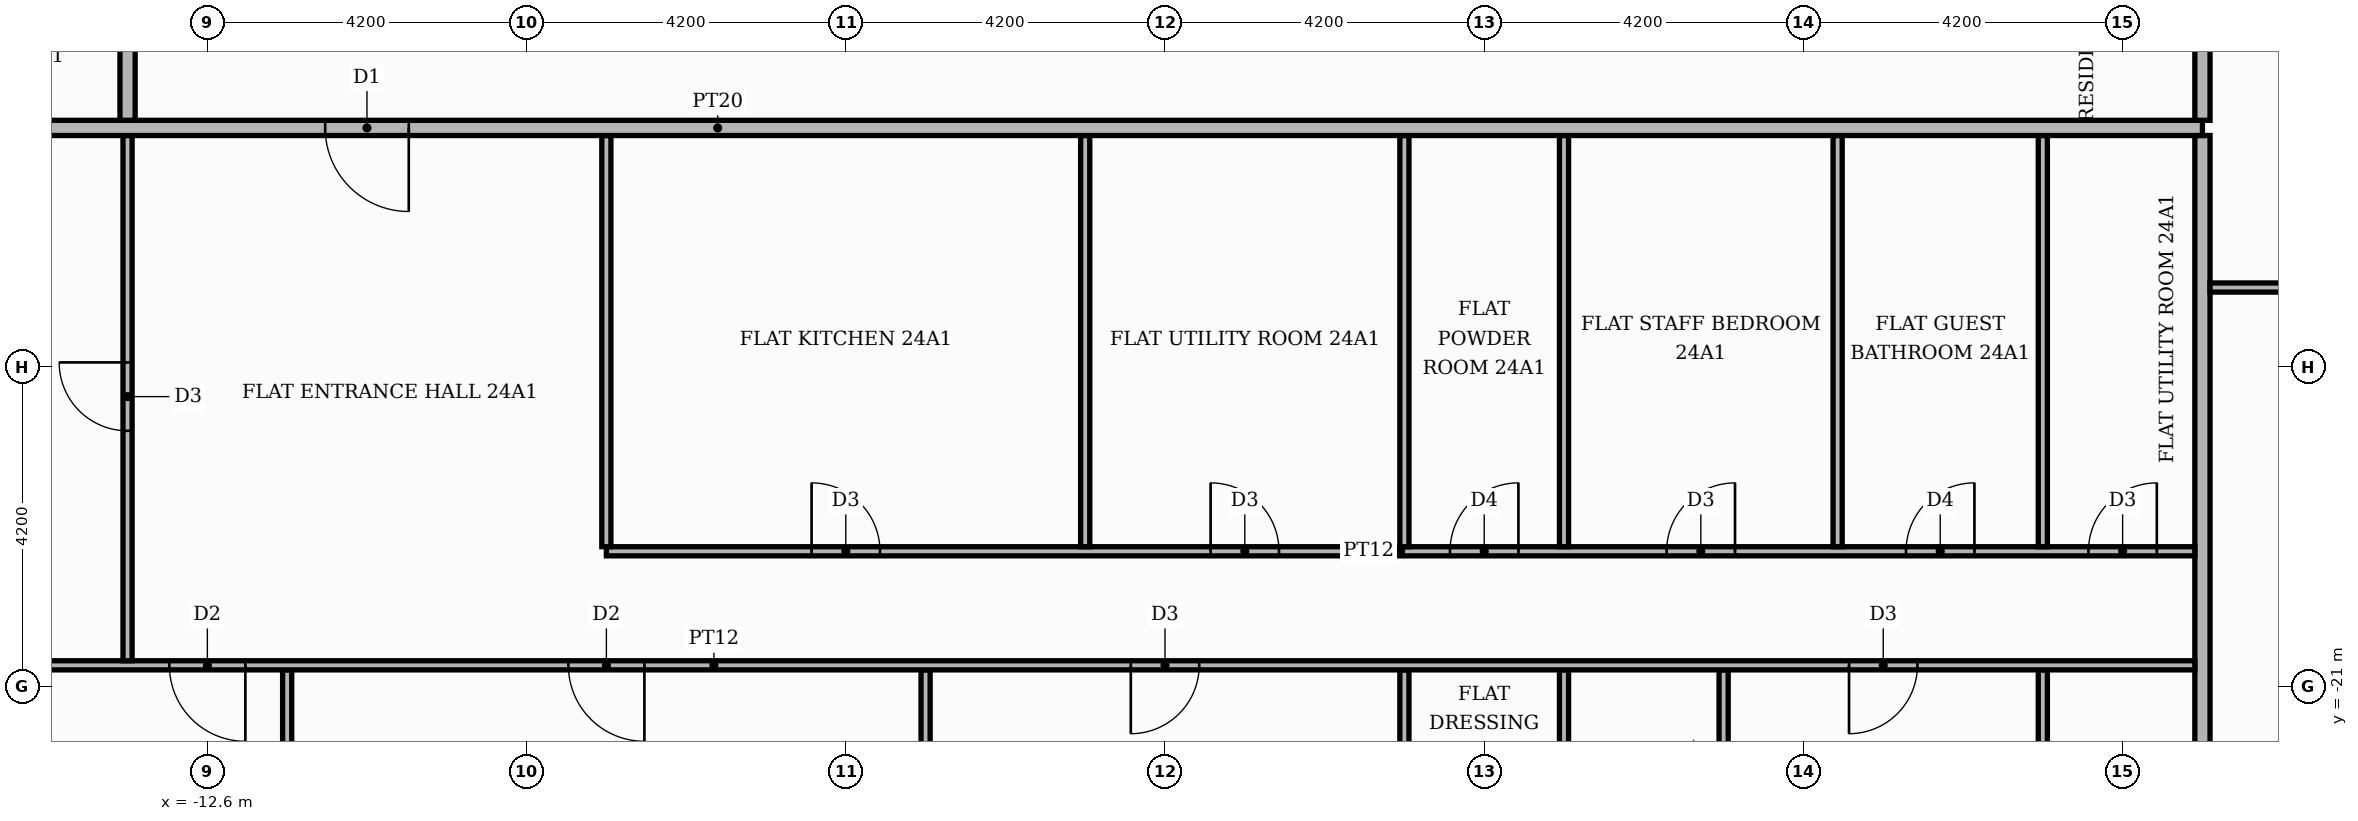
"""IFC4 building model, lengths in metres.
Left out: names, types, materials, properties, quantities, classifications, styles, units other than length and angle.
Written with IfcOpenShell. Run it as: python <this file> out.ifc"""

import sys

from ifc_helpers import new_model, si_unit, direction, frame, frame_2d, origin, place, context, subcontext, project, spatial, rectangle, extrude, element, fill, save


model = new_model("IFC4")
c1 = context("Model", 3, precision=1e-05, world=origin(), true_north=direction((0.0, 1.0)))
c2 = subcontext(c1, "Body", "Model", "MODEL_VIEW")
j1 = project(units=[si_unit("LENGTHUNIT", "METRE"), si_unit("PLANEANGLEUNIT", "RADIAN")], contexts=[c1])
p1 = place(None, origin())
s1 = spatial("IfcSite", under=j1, at=p1, CompositionType="ELEMENT")
p2 = place(p1, origin())
s2 = spatial("IfcBuilding", under=s1, at=p2, CompositionType="ELEMENT")
p3 = place(p2, frame((0.0, 0.0, 102.6)))
s3 = spatial("IfcBuildingStorey", under=s2, at=p3, CompositionType="ELEMENT", Elevation=102.6)
for number, where, z_axis, x_axis in (
    (1, (-11.55, -25.42, 0.0), (0.0, 0.0, 1.0), (0.0, 1.0, 0.0)),
    (2, (-3.15, -25.42, 0.0), (0.0, 0.0, 1.0), (0.0, 1.0, 0.0)),
):
    element("IfcWall", number, at=place(p3, frame(where, z_axis=z_axis, x_axis=x_axis)), inside=s3, PredefinedType="PARTITIONING", context=c2, shape_type="SweptSolid", body=[
        extrude(rectangle(XDim=4.64, YDim=0.12, at=frame_2d((2.32, 0.0))), origin(), (0.0, 0.0, 1.0), 3.48),
    ])
p4 = place(p3, frame((3.15, -25.42, 0.0), z_axis=(0.0, 0.0, 1.0), x_axis=(0.0, 1.0, 0.0)))
e3 = element("IfcWall", 3, at=p4, inside=s3, PredefinedType="PARTITIONING", context=c2, shape_type="SweptSolid", body=[
    extrude(rectangle(XDim=4.64, YDim=0.12, at=frame_2d((2.32, 0.0))), origin(), (0.0, 0.0, 1.0), 3.48),
])
p5 = place(p4, frame((1.75, 0.0, 0.0)))
e4 = element("IfcOpeningElement", 4, at=p5, cuts=e3, PredefinedType="OPENING", context=c2, shape_type="SweptSolid", body=[
    extrude(rectangle(XDim=0.9, YDim=2.1, at=frame_2d((0.45, 1.05))), frame((0.0, 0.07, 0.0), z_axis=(0.0, -1.0, 0.0), x_axis=(1.0, 0.0, 0.0)), (0.0, 0.0, 1.0), 0.14),
])
p6 = place(p3, frame((5.25, -25.42, 0.0), z_axis=(0.0, 0.0, 1.0), x_axis=(0.0, 1.0, 0.0)))
e5 = element("IfcWall", 5, at=p6, inside=s3, PredefinedType="PARTITIONING", context=c2, shape_type="SweptSolid", body=[
    extrude(rectangle(XDim=4.64, YDim=0.12, at=frame_2d((2.32, 0.0))), origin(), (0.0, 0.0, 1.0), 3.48),
])
p7 = place(p6, frame((1.75, 0.0, 0.0)))
e6 = element("IfcOpeningElement", 6, at=p7, cuts=e5, PredefinedType="OPENING", context=c2, shape_type="SweptSolid", body=[
    extrude(rectangle(XDim=0.9, YDim=2.1, at=frame_2d((0.45, 1.05))), frame((0.0, 0.07, 0.0), z_axis=(0.0, -1.0, 0.0), x_axis=(1.0, 0.0, 0.0)), (0.0, 0.0, 1.0), 0.14),
])
p8 = place(p3, frame((7.35, -25.42, 0.0), z_axis=(0.0, 0.0, 1.0), x_axis=(0.0, 1.0, 0.0)))
e7 = element("IfcWall", 7, at=p8, inside=s3, PredefinedType="PARTITIONING", context=c2, shape_type="SweptSolid", body=[
    extrude(rectangle(XDim=4.64, YDim=0.12, at=frame_2d((2.32, 0.0))), origin(), (0.0, 0.0, 1.0), 3.48),
])
p9 = place(p3, frame((11.55, -25.42, 0.0), z_axis=(0.0, 0.0, 1.0), x_axis=(0.0, 1.0, 0.0)))
e8 = element("IfcWall", 8, at=p9, inside=s3, PredefinedType="PARTITIONING", context=c2, shape_type="SweptSolid", body=[
    extrude(rectangle(XDim=4.64, YDim=0.12, at=frame_2d((2.32, 0.0))), origin(), (0.0, 0.0, 1.0), 3.48),
])
p10 = place(p9, frame((1.75, 0.0, 0.0)))
e9 = element("IfcOpeningElement", 9, at=p10, cuts=e8, PredefinedType="OPENING", context=c2, shape_type="SweptSolid", body=[
    extrude(rectangle(XDim=0.9, YDim=2.1, at=frame_2d((0.45, 1.05))), frame((0.0, 0.07, 0.0), z_axis=(0.0, -1.0, 0.0), x_axis=(1.0, 0.0, 0.0)), (0.0, 0.0, 1.0), 0.14),
])
p11 = place(p3, frame((13.65, -25.42, 0.0), z_axis=(0.0, 0.0, 1.0), x_axis=(0.0, 1.0, 0.0)))
e10 = element("IfcWall", 10, at=p11, inside=s3, PredefinedType="PARTITIONING", context=c2, shape_type="SweptSolid", body=[
    extrude(rectangle(XDim=11.67, YDim=0.2, at=frame_2d((5.835, 0.0))), origin(), (0.0, 0.0, 1.0), 3.48),
])
p12 = place(p3, frame((-25.42, -20.72, 0.0), z_axis=(0.0, 0.0, 1.0), x_axis=(1.0, 0.0, 0.0)))
e11 = element("IfcWall", 11, at=p12, inside=s3, PredefinedType="PARTITIONING", context=c2, shape_type="SweptSolid", body=[
    extrude(rectangle(XDim=38.97, YDim=0.12, at=frame_2d((19.485, 0.0))), origin(), (0.0, 0.0, 1.0), 3.48),
])
p13 = place(p12, frame((12.32, 0.0, 0.0)))
e12 = element("IfcOpeningElement", 12, at=p13, cuts=e11, PredefinedType="OPENING", context=c2, shape_type="SweptSolid", body=[
    extrude(rectangle(XDim=1.0, YDim=2.1, at=frame_2d((0.5, 1.05))), frame((0.0, 0.07, 0.0), z_axis=(0.0, -1.0, 0.0), x_axis=(1.0, 0.0, 0.0)), (0.0, 0.0, 1.0), 0.14),
])
p14 = place(p12, frame((17.57, 0.0, 0.0)))
e13 = element("IfcOpeningElement", 13, at=p14, cuts=e11, PredefinedType="OPENING", context=c2, shape_type="SweptSolid", body=[
    extrude(rectangle(XDim=1.0, YDim=2.1, at=frame_2d((0.5, 1.05))), frame((0.0, 0.07, 0.0), z_axis=(0.0, -1.0, 0.0), x_axis=(1.0, 0.0, 0.0)), (0.0, 0.0, 1.0), 0.14),
])
p15 = place(p12, frame((24.97, 0.0, 0.0)))
e14 = element("IfcOpeningElement", 14, at=p15, cuts=e11, PredefinedType="OPENING", context=c2, shape_type="SweptSolid", body=[
    extrude(rectangle(XDim=0.9, YDim=2.1, at=frame_2d((0.45, 1.05))), frame((0.0, 0.07, 0.0), z_axis=(0.0, -1.0, 0.0), x_axis=(1.0, 0.0, 0.0)), (0.0, 0.0, 1.0), 0.14),
])
p16 = place(p12, frame((34.42, 0.0, 0.0)))
e15 = element("IfcOpeningElement", 15, at=p16, cuts=e11, PredefinedType="OPENING", context=c2, shape_type="SweptSolid", body=[
    extrude(rectangle(XDim=0.9, YDim=2.1, at=frame_2d((0.45, 1.05))), frame((0.0, 0.07, 0.0), z_axis=(0.0, -1.0, 0.0), x_axis=(1.0, 0.0, 0.0)), (0.0, 0.0, 1.0), 0.14),
])
p17 = place(p3, frame((-13.65, -20.66, 0.0), z_axis=(0.0, 0.0, 1.0), x_axis=(0.0, 1.0, 0.0)))
e16 = element("IfcWall", 16, at=p17, inside=s3, PredefinedType="PARTITIONING", context=c2, shape_type="SweptSolid", body=[
    extrude(rectangle(XDim=6.91, YDim=0.12, at=frame_2d((3.455, 0.0))), origin(), (0.0, 0.0, 1.0), 3.48),
])
p18 = place(p17, frame((3.025, 0.0, 0.0)))
e17 = element("IfcOpeningElement", 17, at=p18, cuts=e16, PredefinedType="OPENING", context=c2, shape_type="SweptSolid", body=[
    extrude(rectangle(XDim=0.9, YDim=2.1, at=frame_2d((0.45, 1.05))), frame((0.0, 0.07, 0.0), z_axis=(0.0, -1.0, 0.0), x_axis=(1.0, 0.0, 0.0)), (0.0, 0.0, 1.0), 0.14),
])
p19 = place(p3, frame((-7.35, -19.22, 0.0), z_axis=(0.0, 0.0, 1.0), x_axis=(1.0, 0.0, 0.0)))
e18 = element("IfcWall", 18, at=p19, inside=s3, PredefinedType="PARTITIONING", context=c2, shape_type="SweptSolid", body=[
    extrude(rectangle(XDim=20.9, YDim=0.12, at=frame_2d((10.45, 0.0))), origin(), (0.0, 0.0, 1.0), 3.48),
])
p20 = place(p19, frame((2.7, 0.0, 0.0)))
e19 = element("IfcOpeningElement", 19, at=p20, cuts=e18, PredefinedType="OPENING", context=c2, shape_type="SweptSolid", body=[
    extrude(rectangle(XDim=0.9, YDim=2.1, at=frame_2d((0.45, 1.05))), frame((0.0, 0.07, 0.0), z_axis=(0.0, -1.0, 0.0), x_axis=(1.0, 0.0, 0.0)), (0.0, 0.0, 1.0), 0.14),
])
p21 = place(p19, frame((7.95, 0.0, 0.0)))
e20 = element("IfcOpeningElement", 20, at=p21, cuts=e18, PredefinedType="OPENING", context=c2, shape_type="SweptSolid", body=[
    extrude(rectangle(XDim=0.9, YDim=2.1, at=frame_2d((0.45, 1.05))), frame((0.0, 0.07, 0.0), z_axis=(0.0, -1.0, 0.0), x_axis=(1.0, 0.0, 0.0)), (0.0, 0.0, 1.0), 0.14),
])
p22 = place(p19, frame((11.1, 0.0, 0.0)))
e21 = element("IfcOpeningElement", 21, at=p22, cuts=e18, PredefinedType="OPENING", context=c2, shape_type="SweptSolid", body=[
    extrude(rectangle(XDim=0.9, YDim=2.1, at=frame_2d((0.45, 1.05))), frame((0.0, 0.07, 0.0), z_axis=(0.0, -1.0, 0.0), x_axis=(1.0, 0.0, 0.0)), (0.0, 0.0, 1.0), 0.14),
])
p23 = place(p19, frame((13.95, 0.0, 0.0)))
e22 = element("IfcOpeningElement", 22, at=p23, cuts=e18, PredefinedType="OPENING", context=c2, shape_type="SweptSolid", body=[
    extrude(rectangle(XDim=0.9, YDim=2.1, at=frame_2d((0.45, 1.05))), frame((0.0, 0.07, 0.0), z_axis=(0.0, -1.0, 0.0), x_axis=(1.0, 0.0, 0.0)), (0.0, 0.0, 1.0), 0.14),
])
p24 = place(p19, frame((17.1, 0.0, 0.0)))
e23 = element("IfcOpeningElement", 23, at=p24, cuts=e18, PredefinedType="OPENING", context=c2, shape_type="SweptSolid", body=[
    extrude(rectangle(XDim=0.9, YDim=2.1, at=frame_2d((0.45, 1.05))), frame((0.0, 0.07, 0.0), z_axis=(0.0, -1.0, 0.0), x_axis=(1.0, 0.0, 0.0)), (0.0, 0.0, 1.0), 0.14),
])
p25 = place(p19, frame((19.5, 0.0, 0.0)))
e24 = element("IfcOpeningElement", 24, at=p25, cuts=e18, PredefinedType="OPENING", context=c2, shape_type="SweptSolid", body=[
    extrude(rectangle(XDim=0.9, YDim=2.1, at=frame_2d((0.45, 1.05))), frame((0.0, 0.07, 0.0), z_axis=(0.0, -1.0, 0.0), x_axis=(1.0, 0.0, 0.0)), (0.0, 0.0, 1.0), 0.14),
])
for number, where, z_axis, x_axis in (
    (25, (-7.35, -19.16, 0.0), (0.0, 0.0, 1.0), (0.0, 1.0, 0.0)),
    (26, (-1.05, -19.16, 0.0), (0.0, 0.0, 1.0), (0.0, 1.0, 0.0)),
    (27, (3.15, -19.16, 0.0), (0.0, 0.0, 1.0), (0.0, 1.0, 0.0)),
    (28, (5.25, -19.16, 0.0), (0.0, 0.0, 1.0), (0.0, 1.0, 0.0)),
    (29, (8.85, -19.16, 0.0), (0.0, 0.0, 1.0), (0.0, 1.0, 0.0)),
    (30, (11.55, -19.16, 0.0), (0.0, 0.0, 1.0), (0.0, 1.0, 0.0)),
):
    element("IfcWall", number, at=place(p3, frame(where, z_axis=z_axis, x_axis=x_axis)), inside=s3, PredefinedType="PARTITIONING", context=c2, shape_type="SweptSolid", body=[
        extrude(rectangle(XDim=5.41, YDim=0.12, at=frame_2d((2.705, 0.0))), origin(), (0.0, 0.0, 1.0), 3.48),
    ])
p26 = place(p3, frame((13.75, -15.75, 0.0), z_axis=(0.0, 0.0, 1.0), x_axis=(1.0, 0.0, 0.0)))
e31 = element("IfcWall", 31, at=p26, inside=s3, PredefinedType="PARTITIONING", context=c2, shape_type="SweptSolid", body=[
    extrude(rectangle(XDim=6.07, YDim=0.12, at=frame_2d((3.035, 0.0))), origin(), (0.0, 0.0, 1.0), 3.48),
])
p27 = place(p26, frame((2.485, 0.0, 0.0)))
e32 = element("IfcOpeningElement", 32, at=p27, cuts=e31, PredefinedType="OPENING", context=c2, shape_type="SweptSolid", body=[
    extrude(rectangle(XDim=1.0, YDim=2.1, at=frame_2d((0.5, 1.05))), frame((0.0, 0.07, 0.0), z_axis=(0.0, -1.0, 0.0), x_axis=(1.0, 0.0, 0.0)), (0.0, 0.0, 1.0), 0.14),
])
p28 = place(p3, frame((-25.42, -13.65, 0.0), z_axis=(0.0, 0.0, 1.0), x_axis=(1.0, 0.0, 0.0)))
e33 = element("IfcWall", 33, at=p28, inside=s3, PredefinedType="PARTITIONING", context=c2, shape_type="SweptSolid", body=[
    extrude(rectangle(XDim=39.07, YDim=0.2, at=frame_2d((19.535, 0.0))), origin(), (0.0, 0.0, 1.0), 3.48),
])
p29 = place(p28, frame((14.37, 0.0, 0.0)))
e34 = element("IfcOpeningElement", 34, at=p29, cuts=e33, PredefinedType="OPENING", context=c2, shape_type="SweptSolid", body=[
    extrude(rectangle(XDim=1.1, YDim=2.4, at=frame_2d((0.55, 1.2))), frame((0.0, 0.11, 0.0), z_axis=(0.0, -1.0, 0.0), x_axis=(1.0, 0.0, 0.0)), (0.0, 0.0, 1.0), 0.22),
])
p30 = place(p3, frame((-13.65, -13.55, 0.0), z_axis=(0.0, 0.0, 1.0), x_axis=(0.0, 1.0, 0.0)))
e35 = element("IfcWall", 35, at=p30, inside=s3, PredefinedType="PARTITIONING", context=c2, shape_type="SweptSolid", body=[
    extrude(rectangle(XDim=27.1, YDim=0.2, at=frame_2d((13.55, 0.0))), origin(), (0.0, 0.0, 1.0), 3.48),
])
p31 = place(p30, frame((23.5, 0.0, 0.0)))
e36 = element("IfcOpeningElement", 36, at=p31, cuts=e35, PredefinedType="OPENING", context=c2, shape_type="SweptSolid", body=[
    extrude(rectangle(XDim=1.1, YDim=2.4, at=frame_2d((0.55, 1.2))), frame((0.0, 0.11, 0.0), z_axis=(0.0, -1.0, 0.0), x_axis=(1.0, 0.0, 0.0)), (0.0, 0.0, 1.0), 0.22),
])
p32 = place(p3, frame((13.65, -13.55, 0.0), z_axis=(0.0, 0.0, 1.0), x_axis=(0.0, 1.0, 0.0)))
e37 = element("IfcWall", 37, at=p32, inside=s3, PredefinedType="PARTITIONING", context=c2, shape_type="SweptSolid", body=[
    extrude(rectangle(XDim=8.2, YDim=0.2, at=frame_2d((4.1, 0.0))), origin(), (0.0, 0.0, 1.0), 3.48),
])
p33 = place(p32, frame((1.45, 0.0, 0.0)))
e38 = element("IfcOpeningElement", 38, at=p33, cuts=e37, PredefinedType="OPENING", context=c2, shape_type="SweptSolid", body=[
    extrude(rectangle(XDim=1.1, YDim=2.4, at=frame_2d((0.55, 1.2))), frame((0.0, 0.11, 0.0), z_axis=(0.0, -1.0, 0.0), x_axis=(1.0, 0.0, 0.0)), (0.0, 0.0, 1.0), 0.22),
])
p34 = place(p29, frame((1.1, 0.0, 0.0), z_axis=(0.0, 0.0, 1.0), x_axis=(-1.0, 0.0, 0.0)))
e39 = element("IfcDoor", 39, at=p34, inside=s3, OperationType="SINGLE_SWING_RIGHT", PredefinedType="DOOR", context=c2, shape_type="SweptSolid", body=[
    extrude(rectangle(XDim=1.1, YDim=2.4, at=frame_2d((0.55, 1.2))), frame((0.0, 0.025, 0.0), z_axis=(0.0, -1.0, 0.0), x_axis=(1.0, 0.0, 0.0)), (0.0, 0.0, 1.0), 0.05),
])
fill(e34, e39)
p35 = place(p18, origin())
e40 = element("IfcDoor", 40, at=p35, inside=s3, OperationType="SINGLE_SWING_RIGHT", PredefinedType="DOOR", context=c2, shape_type="SweptSolid", body=[
    extrude(rectangle(XDim=0.9, YDim=2.1, at=frame_2d((0.45, 1.05))), frame((0.0, 0.025, 0.0), z_axis=(0.0, -1.0, 0.0), x_axis=(1.0, 0.0, 0.0)), (0.0, 0.0, 1.0), 0.05),
])
fill(e17, e40)
p36 = place(p20, origin())
e41 = element("IfcDoor", 41, at=p36, inside=s3, OperationType="SINGLE_SWING_LEFT", PredefinedType="DOOR", context=c2, shape_type="SweptSolid", body=[
    extrude(rectangle(XDim=0.9, YDim=2.1, at=frame_2d((0.45, 1.05))), frame((0.0, 0.025, 0.0), z_axis=(0.0, -1.0, 0.0), x_axis=(1.0, 0.0, 0.0)), (0.0, 0.0, 1.0), 0.05),
])
fill(e19, e41)
p37 = place(p21, origin())
e42 = element("IfcDoor", 42, at=p37, inside=s3, OperationType="SINGLE_SWING_LEFT", PredefinedType="DOOR", context=c2, shape_type="SweptSolid", body=[
    extrude(rectangle(XDim=0.9, YDim=2.1, at=frame_2d((0.45, 1.05))), frame((0.0, 0.025, 0.0), z_axis=(0.0, -1.0, 0.0), x_axis=(1.0, 0.0, 0.0)), (0.0, 0.0, 1.0), 0.05),
])
fill(e20, e42)
p38 = place(p22, origin())
e43 = element("IfcDoor", 43, at=p38, inside=s3, OperationType="SINGLE_SWING_RIGHT", PredefinedType="DOOR", context=c2, shape_type="SweptSolid", body=[
    extrude(rectangle(XDim=0.9, YDim=2.1, at=frame_2d((0.45, 1.05))), frame((0.0, 0.025, 0.0), z_axis=(0.0, -1.0, 0.0), x_axis=(1.0, 0.0, 0.0)), (0.0, 0.0, 1.0), 0.05),
])
fill(e21, e43)
p39 = place(p23, origin())
e44 = element("IfcDoor", 44, at=p39, inside=s3, OperationType="SINGLE_SWING_RIGHT", PredefinedType="DOOR", context=c2, shape_type="SweptSolid", body=[
    extrude(rectangle(XDim=0.9, YDim=2.1, at=frame_2d((0.45, 1.05))), frame((0.0, 0.025, 0.0), z_axis=(0.0, -1.0, 0.0), x_axis=(1.0, 0.0, 0.0)), (0.0, 0.0, 1.0), 0.05),
])
fill(e22, e44)
p40 = place(p24, origin())
e45 = element("IfcDoor", 45, at=p40, inside=s3, OperationType="SINGLE_SWING_RIGHT", PredefinedType="DOOR", context=c2, shape_type="SweptSolid", body=[
    extrude(rectangle(XDim=0.9, YDim=2.1, at=frame_2d((0.45, 1.05))), frame((0.0, 0.025, 0.0), z_axis=(0.0, -1.0, 0.0), x_axis=(1.0, 0.0, 0.0)), (0.0, 0.0, 1.0), 0.05),
])
fill(e23, e45)
p41 = place(p25, origin())
e46 = element("IfcDoor", 46, at=p41, inside=s3, OperationType="SINGLE_SWING_RIGHT", PredefinedType="DOOR", context=c2, shape_type="SweptSolid", body=[
    extrude(rectangle(XDim=0.9, YDim=2.1, at=frame_2d((0.45, 1.05))), frame((0.0, 0.025, 0.0), z_axis=(0.0, -1.0, 0.0), x_axis=(1.0, 0.0, 0.0)), (0.0, 0.0, 1.0), 0.05),
])
fill(e24, e46)
p42 = place(p13, frame((1.0, 0.0, 0.0), z_axis=(0.0, 0.0, 1.0), x_axis=(-1.0, 0.0, 0.0)))
e47 = element("IfcDoor", 47, at=p42, inside=s3, OperationType="SINGLE_SWING_RIGHT", PredefinedType="DOOR", context=c2, shape_type="SweptSolid", body=[
    extrude(rectangle(XDim=1.0, YDim=2.1, at=frame_2d((0.5, 1.05))), frame((0.0, 0.025, 0.0), z_axis=(0.0, -1.0, 0.0), x_axis=(1.0, 0.0, 0.0)), (0.0, 0.0, 1.0), 0.05),
])
fill(e12, e47)
p43 = place(p14, frame((1.0, 0.0, 0.0), z_axis=(0.0, 0.0, 1.0), x_axis=(-1.0, 0.0, 0.0)))
e48 = element("IfcDoor", 48, at=p43, inside=s3, OperationType="SINGLE_SWING_RIGHT", PredefinedType="DOOR", context=c2, shape_type="SweptSolid", body=[
    extrude(rectangle(XDim=1.0, YDim=2.1, at=frame_2d((0.5, 1.05))), frame((0.0, 0.025, 0.0), z_axis=(0.0, -1.0, 0.0), x_axis=(1.0, 0.0, 0.0)), (0.0, 0.0, 1.0), 0.05),
])
fill(e13, e48)
p44 = place(p15, frame((0.9, 0.0, 0.0), z_axis=(0.0, 0.0, 1.0), x_axis=(-1.0, 0.0, 0.0)))
e49 = element("IfcDoor", 49, at=p44, inside=s3, OperationType="SINGLE_SWING_LEFT", PredefinedType="DOOR", context=c2, shape_type="SweptSolid", body=[
    extrude(rectangle(XDim=0.9, YDim=2.1, at=frame_2d((0.45, 1.05))), frame((0.0, 0.025, 0.0), z_axis=(0.0, -1.0, 0.0), x_axis=(1.0, 0.0, 0.0)), (0.0, 0.0, 1.0), 0.05),
])
fill(e14, e49)
p45 = place(p16, frame((0.9, 0.0, 0.0), z_axis=(0.0, 0.0, 1.0), x_axis=(-1.0, 0.0, 0.0)))
e50 = element("IfcDoor", 50, at=p45, inside=s3, OperationType="SINGLE_SWING_LEFT", PredefinedType="DOOR", context=c2, shape_type="SweptSolid", body=[
    extrude(rectangle(XDim=0.9, YDim=2.1, at=frame_2d((0.45, 1.05))), frame((0.0, 0.025, 0.0), z_axis=(0.0, -1.0, 0.0), x_axis=(1.0, 0.0, 0.0)), (0.0, 0.0, 1.0), 0.05),
])
fill(e15, e50)
save(model, sys.argv[1])
